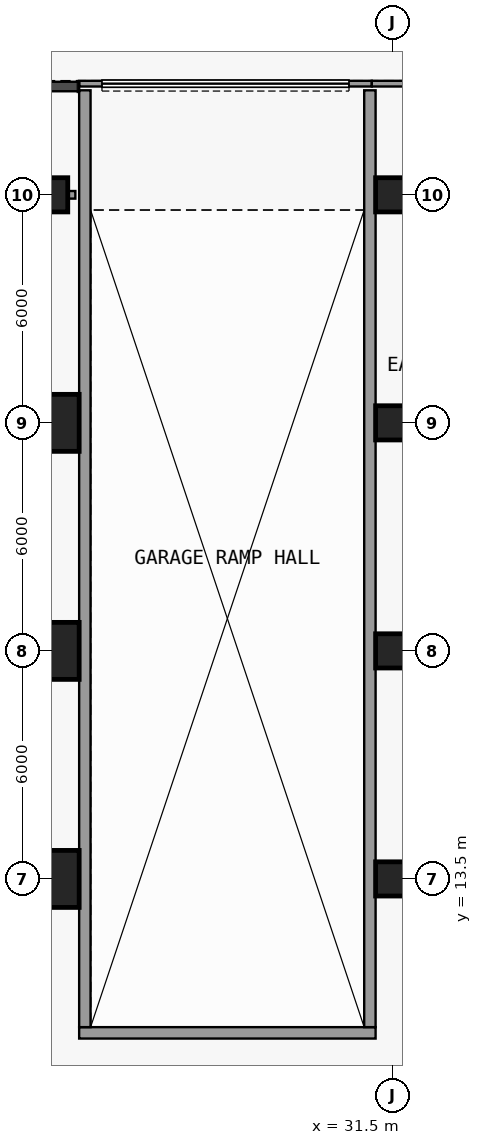
"""IFC4 building model, lengths in metres.
Left out: names, types, materials, properties, quantities, classifications, styles, units other than length and angle.
Written with IfcOpenShell. Run it as: python <this file> out.ifc"""

import sys

from ifc_helpers import new_model, si_unit, direction, frame, frame_2d, origin, origin_2d, place, context, subcontext, project, spatial, rectangle, extrude, element, fill, save


model = new_model("IFC4")
c1 = context("Model", 3, precision=1e-05, world=origin(), true_north=direction((0.0, 1.0)))
c2 = subcontext(c1, "Body", "Model", "MODEL_VIEW")
j1 = project(units=[si_unit("LENGTHUNIT", "METRE"), si_unit("PLANEANGLEUNIT", "RADIAN")], contexts=[c1])
p1 = place(None, origin())
s1 = spatial("IfcSite", under=j1, at=p1, CompositionType="ELEMENT")
p2 = place(p1, origin())
s2 = spatial("IfcBuilding", under=s1, at=p2, CompositionType="ELEMENT")
p3 = place(p2, origin())
s3 = spatial("IfcBuildingStorey", under=s2, at=p3, CompositionType="ELEMENT", Elevation=0.0)
for number, where, z_axis, x_axis in (
    (1, (22.5, 13.5, 0.0), (0.0, 0.0, 1.0), (1.0, 0.0, 0.0)),
    (2, (22.5, 19.5, 0.0), (0.0, 0.0, 1.0), (1.0, 0.0, 0.0)),
    (3, (22.5, 25.5, 0.0), (0.0, 0.0, 1.0), (1.0, 0.0, 0.0)),
):
    element("IfcColumn", number, at=place(p3, frame(where, z_axis=z_axis, x_axis=x_axis)), inside=s3, PredefinedType="COLUMN", context=c2, shape_type="SweptSolid", body=[
        extrude(rectangle(XDim=1.5, YDim=1.5, at=origin_2d()), origin(), (0.0, 0.0, 1.0), 8.0),
    ])
for number, where, z_axis, x_axis in (
    (4, (22.5, 31.5, 0.0), (0.0, 0.0, 1.0), (1.0, 0.0, 0.0)),
    (5, (31.5, 13.5, 0.0), (0.0, 0.0, 1.0), (1.0, 0.0, 0.0)),
    (6, (31.5, 19.5, 0.0), (0.0, 0.0, 1.0), (1.0, 0.0, 0.0)),
    (7, (31.5, 25.5, 0.0), (0.0, 0.0, 1.0), (1.0, 0.0, 0.0)),
    (8, (31.5, 31.5, 0.0), (0.0, 0.0, 1.0), (1.0, 0.0, 0.0)),
):
    element("IfcColumn", number, at=place(p3, frame(where, z_axis=z_axis, x_axis=x_axis)), inside=s3, PredefinedType="COLUMN", context=c2, shape_type="SweptSolid", body=[
        extrude(rectangle(XDim=0.9, YDim=0.9, at=origin_2d()), origin(), (0.0, 0.0, 1.0), 8.0),
    ])
p4 = place(p3, frame((23.25, 9.45, 0.0), z_axis=(0.0, 0.0, 1.0), x_axis=(1.0, 0.0, 0.0)))
e9 = element("IfcWall", 9, at=p4, inside=s3, PredefinedType="SOLIDWALL", context=c2, shape_type="SweptSolid", body=[
    extrude(rectangle(XDim=7.8, YDim=0.3, at=frame_2d((3.9, 0.0))), origin(), (0.0, 0.0, 1.0), 7.65),
])
for number, where, z_axis, x_axis in (
    (10, (23.4, 9.6, 0.0), (0.0, 0.0, 1.0), (0.0, 1.0, 0.0)),
    (11, (30.9, 9.6, 0.0), (0.0, 0.0, 1.0), (0.0, 1.0, 0.0)),
):
    element("IfcWall", number, at=place(p3, frame(where, z_axis=z_axis, x_axis=x_axis)), inside=s3, PredefinedType="SOLIDWALL", context=c2, shape_type="SweptSolid", body=[
        extrude(rectangle(XDim=24.65, YDim=0.3, at=frame_2d((12.325, 0.0))), origin(), (0.0, 0.0, 1.0), 7.65),
    ])
p5 = place(p3, frame((23.25, 34.425, 0.0), z_axis=(0.0, 0.0, 1.0), x_axis=(1.0, 0.0, 0.0)))
e12 = element("IfcWall", 12, at=p5, inside=s3, PredefinedType="SOLIDWALL", context=c2, shape_type="SweptSolid", body=[
    extrude(rectangle(XDim=7.7, YDim=0.15, at=frame_2d((3.85, 0.0))), origin(), (0.0, 0.0, 1.0), 7.65),
])
p6 = place(p5, frame((0.6, 0.0, 0.0)))
e13 = element("IfcOpeningElement", 13, at=p6, cuts=e12, PredefinedType="OPENING", context=c2, shape_type="SweptSolid", body=[
    extrude(rectangle(XDim=6.5, YDim=4.5, at=frame_2d((3.25, 2.25))), frame((0.0, 0.085, 0.0), z_axis=(0.0, -1.0, 0.0), x_axis=(1.0, 0.0, 0.0)), (0.0, 0.0, 1.0), 0.17),
])
p7 = place(p3, frame((30.95, 34.425, 0.0), z_axis=(0.0, 0.0, 1.0), x_axis=(1.0, 0.0, 0.0)))
e14 = element("IfcWall", 14, at=p7, inside=s3, PredefinedType="SOLIDWALL", context=c2, shape_type="SweptSolid", body=[
    extrude(rectangle(XDim=3.55, YDim=0.15, at=frame_2d((1.775, 0.0))), origin(), (0.0, 0.0, 1.0), 7.65),
])
p8 = place(p7, frame((1.15, 0.0, 0.0)))
e15 = element("IfcOpeningElement", 15, at=p8, cuts=e14, PredefinedType="OPENING", context=c2, shape_type="SweptSolid", body=[
    extrude(rectangle(XDim=1.8, YDim=2.4, at=frame_2d((0.9, 1.2))), frame((0.0, 0.085, 0.0), z_axis=(0.0, -1.0, 0.0), x_axis=(1.0, 0.0, 0.0)), (0.0, 0.0, 1.0), 0.17),
])
p9 = place(p3, frame((-31.6, 13.5, 0.0), z_axis=(0.0, 0.0, 1.0), x_axis=(1.0, 0.0, 0.0)))
e16 = element("IfcWall", 16, at=p9, inside=s3, PredefinedType="PARTITIONING", context=c2, shape_type="SweptSolid", body=[
    extrude(rectangle(XDim=54.75, YDim=0.2, at=frame_2d((27.375, 0.0))), origin(), (0.0, 0.0, 1.0), 7.65),
])
p10 = place(p9, frame((7.2, 0.0, 0.0)))
e17 = element("IfcOpeningElement", 17, at=p10, cuts=e16, PredefinedType="OPENING", context=c2, shape_type="SweptSolid", body=[
    extrude(rectangle(XDim=1.0, YDim=2.1, at=frame_2d((0.5, 1.05))), frame((0.0, 0.11, 0.0), z_axis=(0.0, -1.0, 0.0), x_axis=(1.0, 0.0, 0.0)), (0.0, 0.0, 1.0), 0.22),
])
p11 = place(p9, frame((34.2, 0.0, 0.0)))
e18 = element("IfcOpeningElement", 18, at=p11, cuts=e16, PredefinedType="OPENING", context=c2, shape_type="SweptSolid", body=[
    extrude(rectangle(XDim=1.0, YDim=2.1, at=frame_2d((0.5, 1.05))), frame((0.0, 0.11, 0.0), z_axis=(0.0, -1.0, 0.0), x_axis=(1.0, 0.0, 0.0)), (0.0, 0.0, 1.0), 0.22),
])
p12 = place(p9, frame((45.3, 0.0, 0.0)))
e19 = element("IfcOpeningElement", 19, at=p12, cuts=e16, PredefinedType="OPENING", context=c2, shape_type="SweptSolid", body=[
    extrude(rectangle(XDim=1.0, YDim=2.1, at=frame_2d((0.5, 1.05))), frame((0.0, 0.11, 0.0), z_axis=(0.0, -1.0, 0.0), x_axis=(1.0, 0.0, 0.0)), (0.0, 0.0, 1.0), 0.22),
])
p13 = place(p9, frame((52.0, 0.0, 0.0)))
e20 = element("IfcOpeningElement", 20, at=p13, cuts=e16, PredefinedType="OPENING", context=c2, shape_type="SweptSolid", body=[
    extrude(rectangle(XDim=1.0, YDim=2.1, at=frame_2d((0.5, 1.05))), frame((0.0, 0.11, 0.0), z_axis=(0.0, -1.0, 0.0), x_axis=(1.0, 0.0, 0.0)), (0.0, 0.0, 1.0), 0.22),
])
p14 = place(p3, frame((-31.6, 19.5, 0.0), z_axis=(0.0, 0.0, 1.0), x_axis=(1.0, 0.0, 0.0)))
e21 = element("IfcWall", 21, at=p14, inside=s3, PredefinedType="PARTITIONING", context=c2, shape_type="SweptSolid", body=[
    extrude(rectangle(XDim=54.75, YDim=0.2, at=frame_2d((27.375, 0.0))), origin(), (0.0, 0.0, 1.0), 7.65),
])
p15 = place(p14, frame((7.2, 0.0, 0.0)))
e22 = element("IfcOpeningElement", 22, at=p15, cuts=e21, PredefinedType="OPENING", context=c2, shape_type="SweptSolid", body=[
    extrude(rectangle(XDim=1.0, YDim=2.1, at=frame_2d((0.5, 1.05))), frame((0.0, 0.11, 0.0), z_axis=(0.0, -1.0, 0.0), x_axis=(1.0, 0.0, 0.0)), (0.0, 0.0, 1.0), 0.22),
])
p16 = place(p14, frame((16.0, 0.0, 0.0)))
e23 = element("IfcOpeningElement", 23, at=p16, cuts=e21, PredefinedType="OPENING", context=c2, shape_type="SweptSolid", body=[
    extrude(rectangle(XDim=1.0, YDim=2.1, at=frame_2d((0.5, 1.05))), frame((0.0, 0.11, 0.0), z_axis=(0.0, -1.0, 0.0), x_axis=(1.0, 0.0, 0.0)), (0.0, 0.0, 1.0), 0.22),
])
p17 = place(p14, frame((32.5, 0.0, 0.0)))
e24 = element("IfcOpeningElement", 24, at=p17, cuts=e21, PredefinedType="OPENING", context=c2, shape_type="SweptSolid", body=[
    extrude(rectangle(XDim=1.0, YDim=2.1, at=frame_2d((0.5, 1.05))), frame((0.0, 0.11, 0.0), z_axis=(0.0, -1.0, 0.0), x_axis=(1.0, 0.0, 0.0)), (0.0, 0.0, 1.0), 0.22),
])
p18 = place(p14, frame((46.2, 0.0, 0.0)))
e25 = element("IfcOpeningElement", 25, at=p18, cuts=e21, PredefinedType="OPENING", context=c2, shape_type="SweptSolid", body=[
    extrude(rectangle(XDim=1.0, YDim=2.1, at=frame_2d((0.5, 1.05))), frame((0.0, 0.11, 0.0), z_axis=(0.0, -1.0, 0.0), x_axis=(1.0, 0.0, 0.0)), (0.0, 0.0, 1.0), 0.22),
])
p19 = place(p3, frame((-25.5, 25.5, 0.0), z_axis=(0.0, 0.0, 1.0), x_axis=(1.0, 0.0, 0.0)))
e26 = element("IfcWall", 26, at=p19, inside=s3, PredefinedType="PARTITIONING", context=c2, shape_type="SweptSolid", body=[
    extrude(rectangle(XDim=48.65, YDim=0.1, at=frame_2d((24.325, 0.0))), origin(), (0.0, 0.0, 1.0), 7.65),
])
p20 = place(p3, frame((-25.9, 31.5, 0.0), z_axis=(0.0, 0.0, 1.0), x_axis=(1.0, 0.0, 0.0)))
e27 = element("IfcWall", 27, at=p20, inside=s3, PredefinedType="PARTITIONING", context=c2, shape_type="SweptSolid", body=[
    extrude(rectangle(XDim=49.05, YDim=0.2, at=frame_2d((24.525, 0.0))), origin(), (0.0, 0.0, 1.0), 7.65),
])
p21 = place(p20, frame((10.0, 0.0, 0.0)))
e28 = element("IfcOpeningElement", 28, at=p21, cuts=e27, PredefinedType="OPENING", context=c2, shape_type="SweptSolid", body=[
    extrude(rectangle(XDim=1.0, YDim=2.1, at=frame_2d((0.5, 1.05))), frame((0.0, 0.11, 0.0), z_axis=(0.0, -1.0, 0.0), x_axis=(1.0, 0.0, 0.0)), (0.0, 0.0, 1.0), 0.22),
])
p22 = place(p20, frame((38.7, 0.0, 0.0)))
e29 = element("IfcOpeningElement", 29, at=p22, cuts=e27, PredefinedType="OPENING", context=c2, shape_type="SweptSolid", body=[
    extrude(rectangle(XDim=1.0, YDim=2.1, at=frame_2d((0.5, 1.05))), frame((0.0, 0.11, 0.0), z_axis=(0.0, -1.0, 0.0), x_axis=(1.0, 0.0, 0.0)), (0.0, 0.0, 1.0), 0.22),
])
p23 = place(p6, origin())
e30 = element("IfcDoor", 30, at=p23, inside=s3, OperationType="ROLLINGUP", PredefinedType="DOOR", context=c2, shape_type="SweptSolid", body=[
    extrude(rectangle(XDim=6.5, YDim=4.5, at=frame_2d((3.25, 2.25))), frame((0.0, 0.025, 0.0), z_axis=(0.0, -1.0, 0.0), x_axis=(1.0, 0.0, 0.0)), (0.0, 0.0, 1.0), 0.05),
])
fill(e13, e30)
save(model, sys.argv[1])
